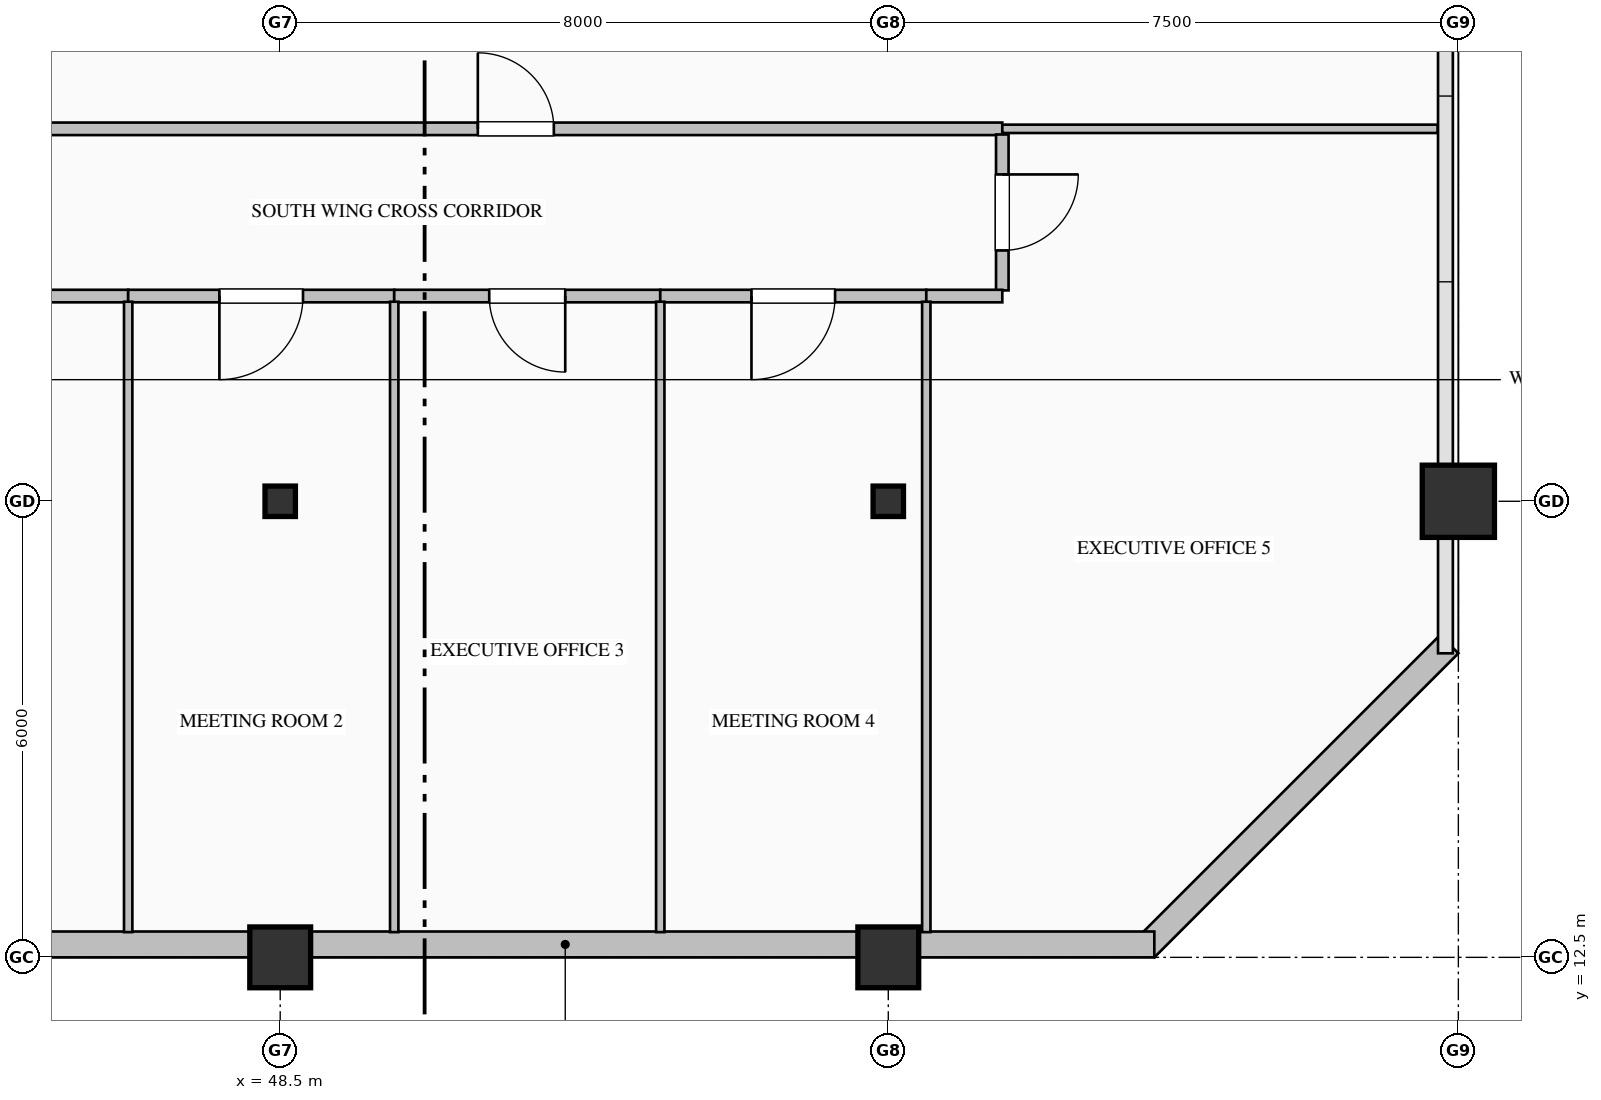
"""IFC4 building model, lengths in metres.
Left out: names, types, materials, properties, quantities, classifications, styles, units other than length and angle.
Written with IfcOpenShell. Run it as: python <this file> out.ifc"""

import sys

from ifc_helpers import new_model, si_unit, direction, frame, frame_2d, origin, origin_2d, place, context, subcontext, project, spatial, rectangle, hollow_rectangle, i_section, extrude, element, fill, save


model = new_model("IFC4")
c1 = context("Model", 3, precision=1e-05, world=origin(), true_north=direction((0.0, 1.0)))
c2 = subcontext(c1, "Body", "Model", "MODEL_VIEW")
j1 = project(units=[si_unit("LENGTHUNIT", "METRE"), si_unit("PLANEANGLEUNIT", "RADIAN")], contexts=[c1])
p1 = place(None, origin())
s1 = spatial("IfcSite", under=j1, at=p1, CompositionType="ELEMENT")
p2 = place(p1, origin())
s2 = spatial("IfcBuilding", under=s1, at=p2, CompositionType="ELEMENT")
p3 = place(p2, frame((0.0, 0.0, 205.8)))
s3 = spatial("IfcBuildingStorey", under=s2, at=p3, CompositionType="ELEMENT", Elevation=205.8)
p4 = place(p3, frame((48.5, 12.5, 0.0), z_axis=(0.0, 0.0, 1.0), x_axis=(1.0, 0.0, 0.0)))
e1 = element("IfcColumn", 1, at=p4, inside=s3, PredefinedType="COLUMN", context=c2, shape_type="SweptSolid", body=[
    extrude(hollow_rectangle(XDim=0.8, YDim=0.8, WallThickness=0.032, at=origin_2d()), origin(), (0.0, 0.0, 1.0), 4.0),
])
p5 = place(p3, frame((48.5, 18.5, 0.0), z_axis=(0.0, 0.0, 1.0), x_axis=(1.0, 0.0, 0.0)))
e2 = element("IfcColumn", 2, at=p5, inside=s3, PredefinedType="COLUMN", context=c2, shape_type="SweptSolid", body=[
    extrude(i_section(OverallWidth=0.4, OverallDepth=0.4, WebThickness=0.013, FlangeThickness=0.021, FilletRadius=0.022, at=origin_2d()), origin(), (0.0, 0.0, 1.0), 4.0),
])
p6 = place(p3, frame((56.5, 12.5, 0.0), z_axis=(0.0, 0.0, 1.0), x_axis=(1.0, 0.0, 0.0)))
e3 = element("IfcColumn", 3, at=p6, inside=s3, PredefinedType="COLUMN", context=c2, shape_type="SweptSolid", body=[
    extrude(hollow_rectangle(XDim=0.8, YDim=0.8, WallThickness=0.032, at=origin_2d()), origin(), (0.0, 0.0, 1.0), 4.0),
])
p7 = place(p3, frame((56.5, 18.5, 0.0), z_axis=(0.0, 0.0, 1.0), x_axis=(1.0, 0.0, 0.0)))
e4 = element("IfcColumn", 4, at=p7, inside=s3, PredefinedType="COLUMN", context=c2, shape_type="SweptSolid", body=[
    extrude(i_section(OverallWidth=0.4, OverallDepth=0.4, WebThickness=0.013, FlangeThickness=0.021, FilletRadius=0.022, at=origin_2d()), origin(), (0.0, 0.0, 1.0), 4.0),
])
p8 = place(p3, frame((64.0, 18.5, 0.0), z_axis=(0.0, 0.0, 1.0), x_axis=(1.0, 0.0, 0.0)))
e5 = element("IfcColumn", 5, at=p8, inside=s3, PredefinedType="COLUMN", context=c2, shape_type="SweptSolid", body=[
    extrude(hollow_rectangle(XDim=0.95, YDim=0.95, WallThickness=0.036, at=origin_2d()), origin(), (0.0, 0.0, 1.0), 4.0),
])
p9 = place(p3, frame((63.88, 16.62, 0.0), z_axis=(0.0, 0.0, 1.0), x_axis=(-0.707106781187, -0.707106781187, 0.0)))
e6 = element("IfcWall", 6, at=p9, inside=s3, PredefinedType="SOLIDWALL", context=c2, shape_type="SweptSolid", body=[
    extrude(rectangle(XDim=5.657, YDim=0.34, at=frame_2d((2.828, 0.0))), origin(), (0.0, 0.0, 1.0), 3.775),
])
p10 = place(p3, frame((60.0, 12.67, 0.0), z_axis=(0.0, 0.0, 1.0), x_axis=(-1.0, 0.0, 0.0)))
e7 = element("IfcWall", 7, at=p10, inside=s3, PredefinedType="SOLIDWALL", context=c2, shape_type="SweptSolid", body=[
    extrude(rectangle(XDim=15.5, YDim=0.34, at=frame_2d((7.75, 0.0))), origin(), (0.0, 0.0, 1.0), 3.325),
])
p11 = place(p3, frame((45.2, 23.4, 0.0), z_axis=(0.0, 0.0, 1.0), x_axis=(1.0, 0.0, 0.0)))
e8 = element("IfcWall", 8, at=p11, inside=s3, PredefinedType="PARTITIONING", context=c2, shape_type="SweptSolid", body=[
    extrude(rectangle(XDim=12.8, YDim=0.165, at=frame_2d((6.4, 0.0))), origin(), (0.0, 0.0, 1.0), 3.467),
])
p12 = place(p11, frame((5.9, 0.0, 0.0)))
e9 = element("IfcOpeningElement", 9, at=p12, cuts=e8, PredefinedType="OPENING", context=c2, shape_type="SweptSolid", body=[
    extrude(rectangle(XDim=1.0, YDim=2.15, at=frame_2d((0.5, 1.075))), frame((0.0, 0.093, 0.0), z_axis=(0.0, -1.0, 0.0), x_axis=(1.0, 0.0, 0.0)), (0.0, 0.0, 1.0), 0.185),
])
p13 = place(p3, frame((46.5, 21.2, 0.0), z_axis=(0.0, 0.0, 1.0), x_axis=(-1.0, 0.0, 0.0)))
e10 = element("IfcWall", 10, at=p13, inside=s3, PredefinedType="PARTITIONING", context=c2, shape_type="SweptSolid", body=[
    extrude(rectangle(XDim=1.3, YDim=0.165, at=frame_2d((0.65, 0.0))), origin(), (0.0, 0.0, 1.0), 3.775),
])
p14 = place(p3, frame((50.0, 21.2, 0.0), z_axis=(0.0, 0.0, 1.0), x_axis=(-1.0, 0.0, 0.0)))
e11 = element("IfcWall", 11, at=p14, inside=s3, PredefinedType="PARTITIONING", context=c2, shape_type="SweptSolid", body=[
    extrude(rectangle(XDim=3.5, YDim=0.165, at=frame_2d((1.75, 0.0))), origin(), (0.0, 0.0, 1.0), 3.775),
])
p15 = place(p14, frame((1.2, 0.0, 0.0)))
e12 = element("IfcOpeningElement", 12, at=p15, cuts=e11, PredefinedType="OPENING", context=c2, shape_type="SweptSolid", body=[
    extrude(rectangle(XDim=1.1, YDim=2.2, at=frame_2d((0.55, 1.1))), frame((0.0, 0.093, 0.0), z_axis=(0.0, -1.0, 0.0), x_axis=(1.0, 0.0, 0.0)), (0.0, 0.0, 1.0), 0.185),
])
p16 = place(p3, frame((53.5, 21.2, 0.0), z_axis=(0.0, 0.0, 1.0), x_axis=(-1.0, 0.0, 0.0)))
e13 = element("IfcWall", 13, at=p16, inside=s3, PredefinedType="PARTITIONING", context=c2, shape_type="SweptSolid", body=[
    extrude(rectangle(XDim=3.5, YDim=0.165, at=frame_2d((1.75, 0.0))), origin(), (0.0, 0.0, 1.0), 3.775),
])
p17 = place(p16, frame((1.25, 0.0, 0.0)))
e14 = element("IfcOpeningElement", 14, at=p17, cuts=e13, PredefinedType="OPENING", context=c2, shape_type="SweptSolid", body=[
    extrude(rectangle(XDim=1.0, YDim=2.15, at=frame_2d((0.5, 1.075))), frame((0.0, 0.093, 0.0), z_axis=(0.0, -1.0, 0.0), x_axis=(1.0, 0.0, 0.0)), (0.0, 0.0, 1.0), 0.185),
])
p18 = place(p3, frame((57.0, 21.2, 0.0), z_axis=(0.0, 0.0, 1.0), x_axis=(-1.0, 0.0, 0.0)))
e15 = element("IfcWall", 15, at=p18, inside=s3, PredefinedType="PARTITIONING", context=c2, shape_type="SweptSolid", body=[
    extrude(rectangle(XDim=3.5, YDim=0.165, at=frame_2d((1.75, 0.0))), origin(), (0.0, 0.0, 1.0), 3.775),
])
p19 = place(p18, frame((1.2, 0.0, 0.0)))
e16 = element("IfcOpeningElement", 16, at=p19, cuts=e15, PredefinedType="OPENING", context=c2, shape_type="SweptSolid", body=[
    extrude(rectangle(XDim=1.1, YDim=2.2, at=frame_2d((0.55, 1.1))), frame((0.0, 0.093, 0.0), z_axis=(0.0, -1.0, 0.0), x_axis=(1.0, 0.0, 0.0)), (0.0, 0.0, 1.0), 0.185),
])
p20 = place(p3, frame((58.0, 23.325, 0.0), z_axis=(0.0, 0.0, 1.0), x_axis=(0.0, -1.0, 0.0)))
e17 = element("IfcWall", 17, at=p20, inside=s3, PredefinedType="PARTITIONING", context=c2, shape_type="SweptSolid", body=[
    extrude(rectangle(XDim=2.051, YDim=0.165, at=frame_2d((1.025, 0.0))), origin(), (0.0, 0.0, 1.0), 3.775),
])
p21 = place(p20, frame((0.525, 0.0, 0.0)))
e18 = element("IfcOpeningElement", 18, at=p21, cuts=e17, PredefinedType="OPENING", context=c2, shape_type="SweptSolid", body=[
    extrude(rectangle(XDim=1.0, YDim=2.15, at=frame_2d((0.5, 1.075))), frame((0.0, 0.093, 0.0), z_axis=(0.0, -1.0, 0.0), x_axis=(1.0, 0.0, 0.0)), (0.0, 0.0, 1.0), 0.185),
])
p22 = place(p3, frame((58.0, 21.2, 0.0), z_axis=(0.0, 0.0, 1.0), x_axis=(-1.0, 0.0, 0.0)))
e19 = element("IfcWall", 19, at=p22, inside=s3, PredefinedType="PARTITIONING", context=c2, shape_type="SweptSolid", body=[
    extrude(rectangle(XDim=1.0, YDim=0.165, at=frame_2d((0.5, 0.0))), origin(), (0.0, 0.0, 1.0), 3.775),
])
p23 = place(p3, frame((63.728, 23.4, 0.0), z_axis=(0.0, 0.0, 1.0), x_axis=(-1.0, 0.0, 0.0)))
e20 = element("IfcWall", 20, at=p23, inside=s3, PredefinedType="MOVABLE", context=c2, shape_type="SweptSolid", body=[
    extrude(rectangle(XDim=5.728, YDim=0.11, at=frame_2d((2.864, 0.0))), origin(), (0.0, 0.0, 1.0), 3.775),
])
for number, where, z_axis, x_axis in (
    (21, (46.5, 21.125, 0.0), (0.0, 0.0, 1.0), (0.0, -1.0, 0.0)),
    (22, (50.0, 21.125, 0.0), (0.0, 0.0, 1.0), (0.0, -1.0, 0.0)),
    (23, (53.5, 21.125, 0.0), (0.0, 0.0, 1.0), (0.0, -1.0, 0.0)),
    (24, (57.0, 21.125, 0.0), (0.0, 0.0, 1.0), (0.0, -1.0, 0.0)),
):
    element("IfcWall", number, at=place(p3, frame(where, z_axis=z_axis, x_axis=x_axis)), inside=s3, PredefinedType="MOVABLE", context=c2, shape_type="SweptSolid", body=[
        extrude(rectangle(XDim=8.293, YDim=0.11, at=frame_2d((4.147, 0.0))), origin(), (0.0, 0.0, 1.0), 3.775),
    ])
p24 = place(p12, origin())
e25 = element("IfcDoor", 25, at=p24, inside=s3, OperationType="SINGLE_SWING_LEFT", PredefinedType="DOOR", context=c2, shape_type="SweptSolid", body=[
    extrude(rectangle(XDim=1.0, YDim=2.15, at=frame_2d((0.5, 1.075))), frame((0.0, 0.025, 0.0), z_axis=(0.0, -1.0, 0.0), x_axis=(1.0, 0.0, 0.0)), (0.0, 0.0, 1.0), 0.05),
])
fill(e9, e25)
p25 = place(p15, origin())
e26 = element("IfcDoor", 26, at=p25, inside=s3, OperationType="SINGLE_SWING_RIGHT", PredefinedType="DOOR", context=c2, shape_type="SweptSolid", body=[
    extrude(rectangle(XDim=1.1, YDim=2.2, at=frame_2d((0.55, 1.1))), frame((0.0, 0.025, 0.0), z_axis=(0.0, -1.0, 0.0), x_axis=(1.0, 0.0, 0.0)), (0.0, 0.0, 1.0), 0.05),
])
fill(e12, e26)
p26 = place(p17, origin())
e27 = element("IfcDoor", 27, at=p26, inside=s3, OperationType="SINGLE_SWING_LEFT", PredefinedType="DOOR", context=c2, shape_type="SweptSolid", body=[
    extrude(rectangle(XDim=1.0, YDim=2.15, at=frame_2d((0.5, 1.075))), frame((0.0, 0.025, 0.0), z_axis=(0.0, -1.0, 0.0), x_axis=(1.0, 0.0, 0.0)), (0.0, 0.0, 1.0), 0.05),
])
fill(e14, e27)
p27 = place(p19, origin())
e28 = element("IfcDoor", 28, at=p27, inside=s3, OperationType="SINGLE_SWING_RIGHT", PredefinedType="DOOR", context=c2, shape_type="SweptSolid", body=[
    extrude(rectangle(XDim=1.1, YDim=2.2, at=frame_2d((0.55, 1.1))), frame((0.0, 0.025, 0.0), z_axis=(0.0, -1.0, 0.0), x_axis=(1.0, 0.0, 0.0)), (0.0, 0.0, 1.0), 0.05),
])
fill(e16, e28)
p28 = place(p21, origin())
e29 = element("IfcDoor", 29, at=p28, inside=s3, OperationType="SINGLE_SWING_LEFT", PredefinedType="DOOR", context=c2, shape_type="SweptSolid", body=[
    extrude(rectangle(XDim=1.0, YDim=2.15, at=frame_2d((0.5, 1.075))), frame((0.0, 0.025, 0.0), z_axis=(0.0, -1.0, 0.0), x_axis=(1.0, 0.0, 0.0)), (0.0, 0.0, 1.0), 0.05),
])
fill(e18, e29)
save(model, sys.argv[1])
